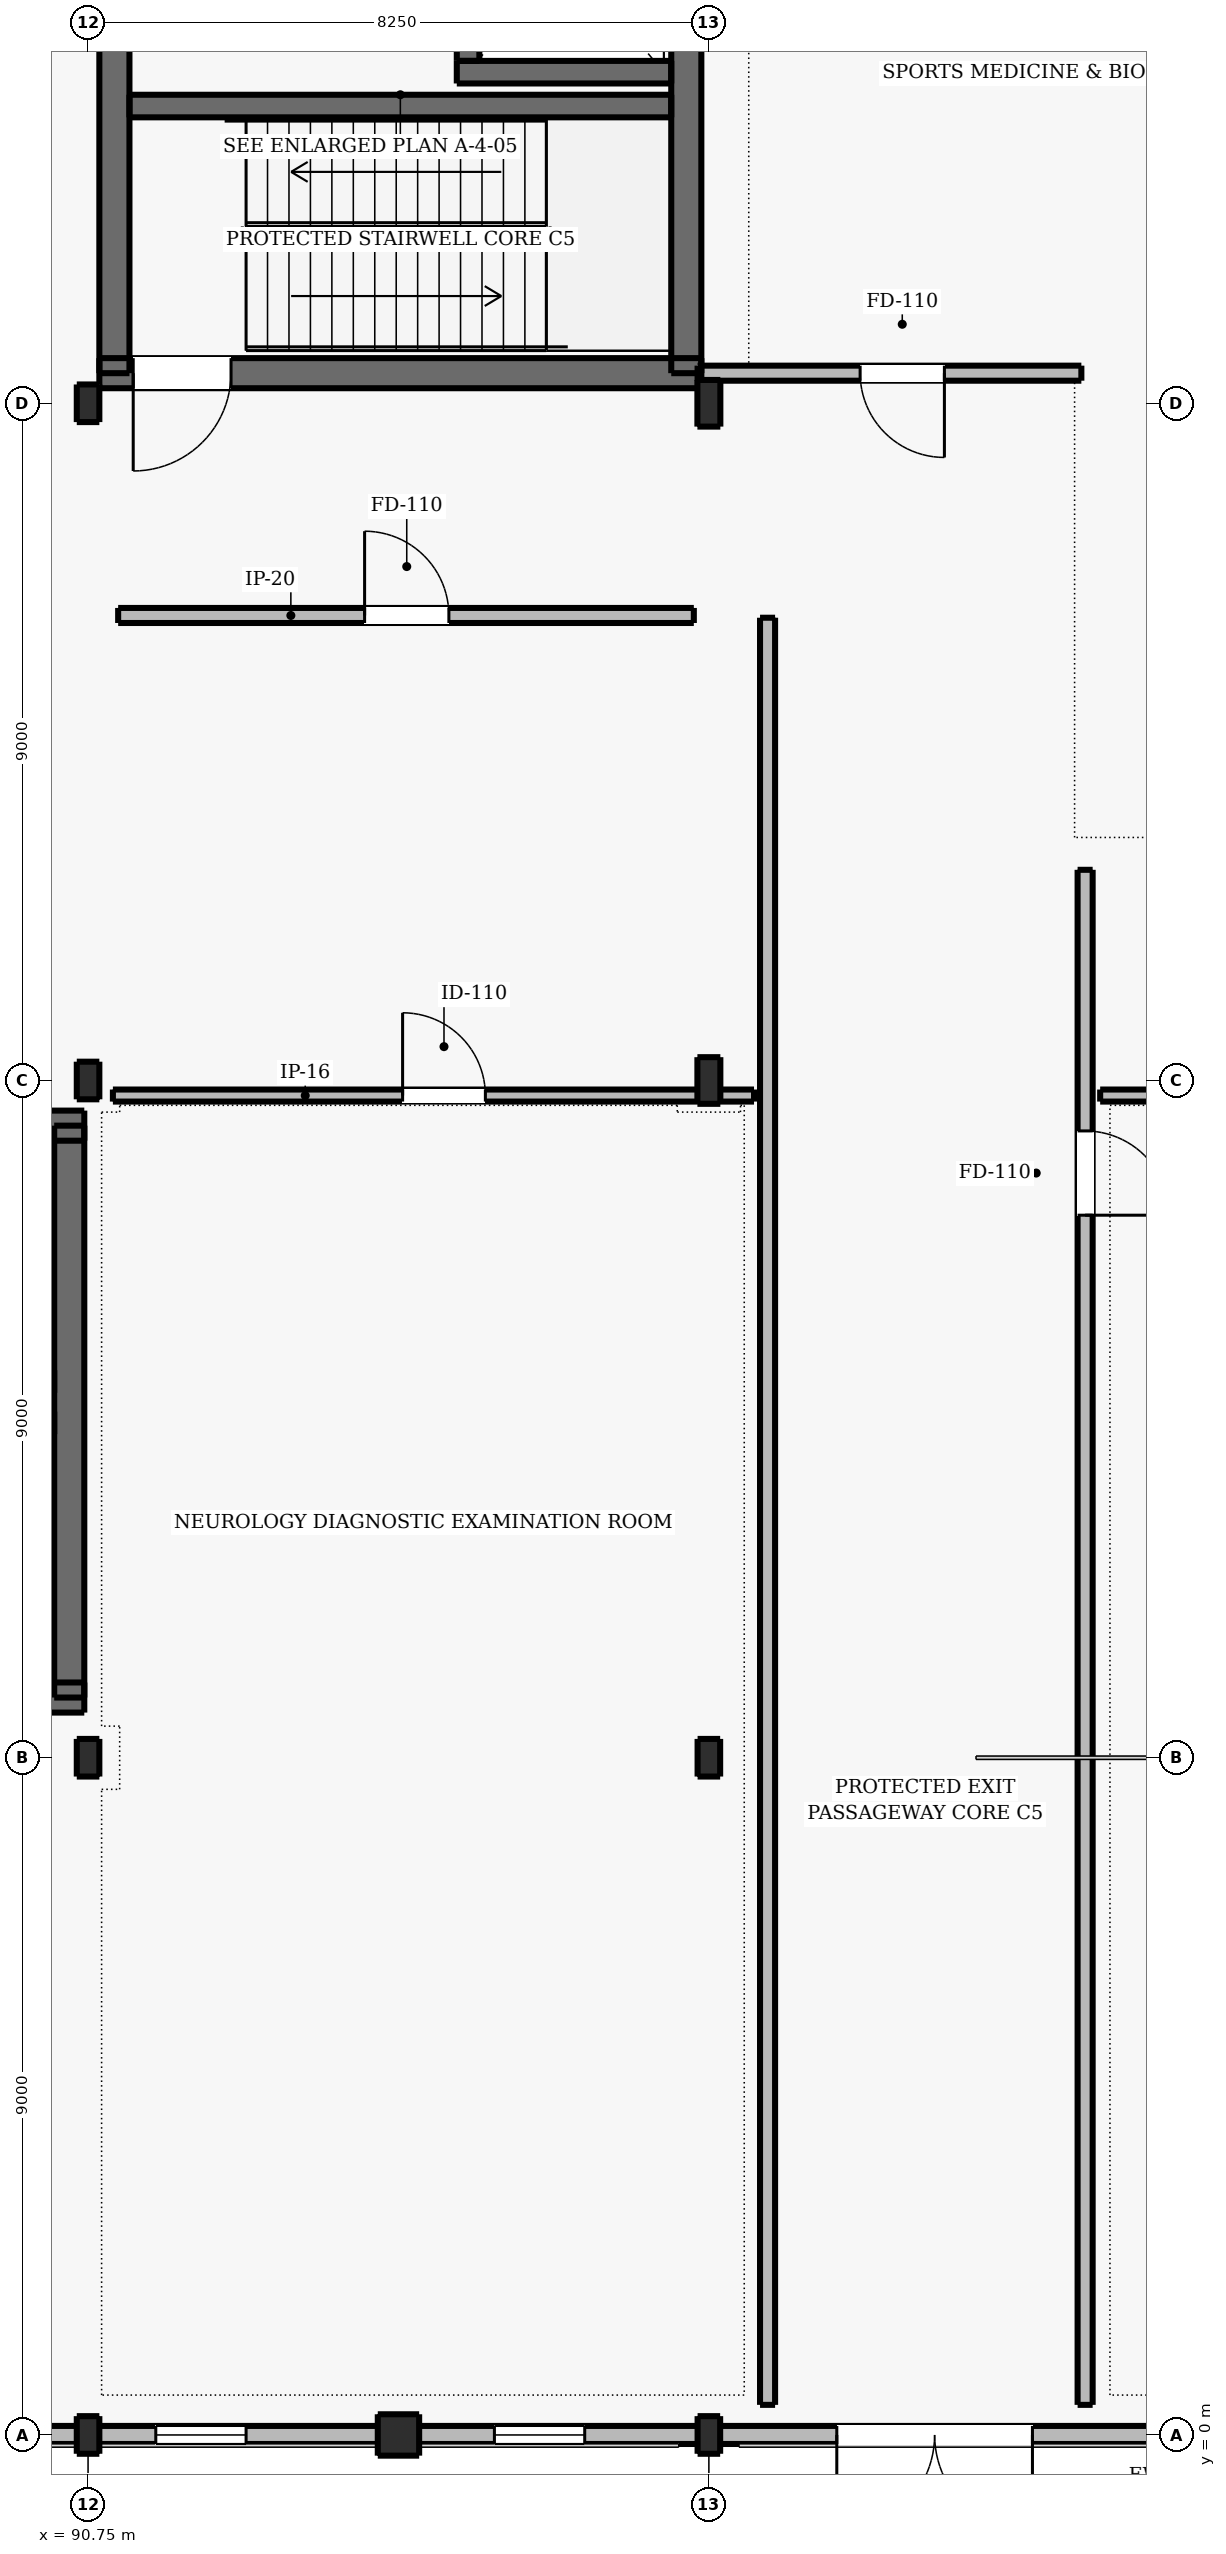
"""IFC4 building model, lengths in metres.
Left out: names, types, materials, properties, quantities, classifications, styles, units other than length and angle.
Written with IfcOpenShell. Run it as: python <this file> out.ifc"""

import sys

from ifc_helpers import new_model, si_unit, direction, frame, frame_2d, origin, origin_2d, place, context, subcontext, project, spatial, rectangle, i_section, extrude, element, fill, save


model = new_model("IFC4")
c1 = context("Model", 3, precision=1e-05, world=origin(), true_north=direction((0.0, 1.0)))
c2 = subcontext(c1, "Body", "Model", "MODEL_VIEW")
j1 = project(units=[si_unit("LENGTHUNIT", "METRE"), si_unit("PLANEANGLEUNIT", "RADIAN")], contexts=[c1])
p1 = place(None, origin())
s1 = spatial("IfcSite", under=j1, at=p1, CompositionType="ELEMENT")
p2 = place(p1, origin())
s2 = spatial("IfcBuilding", under=s1, at=p2, CompositionType="ELEMENT")
p3 = place(p2, origin())
s3 = spatial("IfcBuildingStorey", under=s2, at=p3, CompositionType="ELEMENT", Elevation=0.0)
for number, where, z_axis, x_axis in (
    (1, (90.75, 0.0, 0.0), (0.0, 0.0, 1.0), (1.0, 0.0, 0.0)),
    (2, (90.75, 9.0, 0.0), (0.0, 0.0, 1.0), (1.0, 0.0, 0.0)),
    (3, (90.75, 18.0, 0.0), (0.0, 0.0, 1.0), (1.0, 0.0, 0.0)),
    (4, (90.75, 27.0, 0.0), (0.0, 0.0, 1.0), (1.0, 0.0, 0.0)),
):
    element("IfcColumn", number, at=place(p3, frame(where, z_axis=z_axis, x_axis=x_axis)), inside=s3, PredefinedType="COLUMN", context=c2, shape_type="SweptSolid", body=[
        extrude(i_section(OverallWidth=0.3, OverallDepth=0.5, WebThickness=0.014, FlangeThickness=0.028, FilletRadius=0.027, at=origin_2d()), origin(), (0.0, 0.0, 1.0), 5.1),
    ])
p4 = place(p3, frame((94.875, 0.0, 0.0), z_axis=(0.0, 0.0, 1.0), x_axis=(1.0, 0.0, 0.0)))
e5 = element("IfcColumn", 5, at=p4, inside=s3, PredefinedType="PILASTER", context=c2, shape_type="SweptSolid", body=[
    extrude(rectangle(XDim=0.55, YDim=0.55, at=origin_2d()), origin(), (0.0, 0.0, 1.0), 5.1),
])
for number, where, z_axis, x_axis in (
    (6, (99.0, 0.0, 0.0), (0.0, 0.0, 1.0), (1.0, 0.0, 0.0)),
    (7, (99.0, 9.0, 0.0), (0.0, 0.0, 1.0), (1.0, 0.0, 0.0)),
):
    element("IfcColumn", number, at=place(p3, frame(where, z_axis=z_axis, x_axis=x_axis)), inside=s3, PredefinedType="COLUMN", context=c2, shape_type="SweptSolid", body=[
        extrude(i_section(OverallWidth=0.3, OverallDepth=0.5, WebThickness=0.014, FlangeThickness=0.028, FilletRadius=0.027, at=origin_2d()), origin(), (0.0, 0.0, 1.0), 5.1),
    ])
for number, where, z_axis, x_axis in (
    (8, (99.0, 18.0, 0.0), (0.0, 0.0, 1.0), (1.0, 0.0, 0.0)),
    (9, (99.0, 27.0, 0.0), (0.0, 0.0, 1.0), (1.0, 0.0, 0.0)),
):
    element("IfcColumn", number, at=place(p3, frame(where, z_axis=z_axis, x_axis=x_axis)), inside=s3, PredefinedType="COLUMN", context=c2, shape_type="SweptSolid", body=[
        extrude(i_section(OverallWidth=0.305, OverallDepth=0.62, WebThickness=0.021, FlangeThickness=0.04, FilletRadius=0.027, at=origin_2d()), origin(), (0.0, 0.0, 1.0), 5.1),
    ])
p5 = place(p3, frame((82.7, 9.8, 0.0), z_axis=(0.0, 0.0, 1.0), x_axis=(1.0, 0.0, 0.0)))
e10 = element("IfcWall", 10, at=p5, inside=s3, PredefinedType="SHEAR", context=c2, shape_type="SweptSolid", body=[
    extrude(rectangle(XDim=8.0, YDim=0.4, at=frame_2d((4.0, 0.0))), origin(), (0.0, 0.0, 1.0), 5.1),
])
p6 = place(p5, frame((0.45, 0.0, 0.0)))
e11 = element("IfcOpeningElement", 11, at=p6, cuts=e10, PredefinedType="OPENING", context=c2, shape_type="SweptSolid", body=[
    extrude(rectangle(XDim=1.3, YDim=2.15, at=frame_2d((0.65, 1.075))), frame((0.0, 0.21, 0.0), z_axis=(0.0, -1.0, 0.0), x_axis=(1.0, 0.0, 0.0)), (0.0, 0.0, 1.0), 0.42),
])
p7 = place(p3, frame((82.7, 17.4, 0.0), z_axis=(0.0, 0.0, 1.0), x_axis=(1.0, 0.0, 0.0)))
e12 = element("IfcWall", 12, at=p7, inside=s3, PredefinedType="SHEAR", context=c2, shape_type="SweptSolid", body=[
    extrude(rectangle(XDim=8.0, YDim=0.4, at=frame_2d((4.0, 0.0))), origin(), (0.0, 0.0, 1.0), 5.1),
])
p8 = place(p3, frame((90.5, 9.8, 0.0), z_axis=(0.0, 0.0, 1.0), x_axis=(0.0, 1.0, 0.0)))
e13 = element("IfcWall", 13, at=p8, inside=s3, PredefinedType="SHEAR", context=c2, shape_type="SweptSolid", body=[
    extrude(rectangle(XDim=7.6, YDim=0.4, at=frame_2d((3.8, 0.0))), origin(), (0.0, 0.0, 1.0), 5.1),
])
p9 = place(p3, frame((83.1, 13.45, 0.0), z_axis=(0.0, 0.0, 1.0), x_axis=(1.0, 0.0, 0.0)))
e14 = element("IfcWall", 14, at=p9, inside=s3, PredefinedType="SHEAR", context=c2, shape_type="SweptSolid", body=[
    extrude(rectangle(XDim=7.2, YDim=0.3, at=frame_2d((3.6, 0.0))), origin(), (0.0, 0.0, 1.0), 5.1),
])
p10 = place(p3, frame((87.55, 14.0, 0.0), z_axis=(0.0, 0.0, 1.0), x_axis=(1.0, 0.0, 0.0)))
e15 = element("IfcWall", 15, at=p10, inside=s3, PredefinedType="SHEAR", context=c2, shape_type="SweptSolid", body=[
    extrude(rectangle(XDim=2.75, YDim=0.3, at=frame_2d((1.375, 0.0))), origin(), (0.0, 0.0, 1.0), 5.1),
])
p11 = place(p3, frame((90.9, 27.4, 0.0), z_axis=(0.0, 0.0, 1.0), x_axis=(1.0, 0.0, 0.0)))
e16 = element("IfcWall", 16, at=p11, inside=s3, PredefinedType="SHEAR", context=c2, shape_type="SweptSolid", body=[
    extrude(rectangle(XDim=8.0, YDim=0.4, at=frame_2d((4.0, 0.0))), origin(), (0.0, 0.0, 1.0), 5.1),
])
p12 = place(p11, frame((0.45, 0.0, 0.0)))
e17 = element("IfcOpeningElement", 17, at=p12, cuts=e16, PredefinedType="OPENING", context=c2, shape_type="SweptSolid", body=[
    extrude(rectangle(XDim=1.3, YDim=2.15, at=frame_2d((0.65, 1.075))), frame((0.0, 0.21, 0.0), z_axis=(0.0, -1.0, 0.0), x_axis=(1.0, 0.0, 0.0)), (0.0, 0.0, 1.0), 0.42),
])
for number, where, z_axis, x_axis in (
    (18, (91.1, 27.4, 0.0), (0.0, 0.0, 1.0), (0.0, 1.0, 0.0)),
    (19, (98.7, 27.4, 0.0), (0.0, 0.0, 1.0), (0.0, 1.0, 0.0)),
):
    element("IfcWall", number, at=place(p3, frame(where, z_axis=z_axis, x_axis=x_axis)), inside=s3, PredefinedType="SHEAR", context=c2, shape_type="SweptSolid", body=[
        extrude(rectangle(XDim=7.4, YDim=0.4, at=frame_2d((3.7, 0.0))), origin(), (0.0, 0.0, 1.0), 5.1),
    ])
p13 = place(p3, frame((91.3, 30.95, 0.0), z_axis=(0.0, 0.0, 1.0), x_axis=(1.0, 0.0, 0.0)))
e20 = element("IfcWall", 20, at=p13, inside=s3, PredefinedType="SHEAR", context=c2, shape_type="SweptSolid", body=[
    extrude(rectangle(XDim=7.2, YDim=0.3, at=frame_2d((3.6, 0.0))), origin(), (0.0, 0.0, 1.0), 5.1),
])
p14 = place(p3, frame((95.65, 31.4, 0.0), z_axis=(0.0, 0.0, 1.0), x_axis=(1.0, 0.0, 0.0)))
e21 = element("IfcWall", 21, at=p14, inside=s3, PredefinedType="SHEAR", context=c2, shape_type="SweptSolid", body=[
    extrude(rectangle(XDim=2.85, YDim=0.3, at=frame_2d((1.425, 0.0))), origin(), (0.0, 0.0, 1.0), 5.1),
])
p15 = place(p3, frame((95.8, 31.55, 0.0), z_axis=(0.0, 0.0, 1.0), x_axis=(0.0, 1.0, 0.0)))
e22 = element("IfcWall", 22, at=p15, inside=s3, PredefinedType="SHEAR", context=c2, shape_type="SweptSolid", body=[
    extrude(rectangle(XDim=3.05, YDim=0.3, at=frame_2d((1.525, 0.0))), origin(), (0.0, 0.0, 1.0), 5.1),
])
p16 = place(p15, frame((0.975, 0.0, 0.0)))
e23 = element("IfcOpeningElement", 23, at=p16, cuts=e22, PredefinedType="OPENING", context=c2, shape_type="SweptSolid", body=[
    extrude(rectangle(XDim=1.1, YDim=2.15, at=frame_2d((0.55, 1.075))), frame((0.0, 0.16, 0.0), z_axis=(0.0, -1.0, 0.0), x_axis=(1.0, 0.0, 0.0)), (0.0, 0.0, 1.0), 0.32),
])
p17 = place(p3, frame((99.0, 0.0, 0.0), z_axis=(0.0, 0.0, 1.0), x_axis=(-1.0, 0.0, 0.0)))
e24 = element("IfcWall", 24, at=p17, inside=s3, PredefinedType="SOLIDWALL", context=c2, shape_type="SweptSolid", body=[
    extrude(rectangle(XDim=45.0, YDim=0.24, at=frame_2d((22.5, 0.0))), origin(), (0.0, 0.0, 1.0), 4.31),
])
p18 = place(p17, frame((29.64, 0.0, 0.0)))
e25 = element("IfcOpeningElement", 25, at=p18, cuts=e24, PredefinedType="OPENING", context=c2, shape_type="SweptSolid", body=[
    extrude(rectangle(XDim=2.6, YDim=2.6, at=frame_2d((1.3, 1.3))), frame((0.0, 0.13, 0.0), z_axis=(0.0, -1.0, 0.0), x_axis=(1.0, 0.0, 0.0)), (0.0, 0.0, 1.0), 0.26),
])
p19 = place(p17, frame((17.26, 0.0, 0.0)))
e26 = element("IfcOpeningElement", 26, at=p19, cuts=e24, PredefinedType="OPENING", context=c2, shape_type="SweptSolid", body=[
    extrude(rectangle(XDim=2.6, YDim=2.6, at=frame_2d((1.3, 1.3))), frame((0.0, 0.13, 0.0), z_axis=(0.0, -1.0, 0.0), x_axis=(1.0, 0.0, 0.0)), (0.0, 0.0, 1.0), 0.26),
])
p20 = place(p17, frame((9.01, 0.0, 0.0)))
e27 = element("IfcOpeningElement", 27, at=p20, cuts=e24, PredefinedType="OPENING", context=c2, shape_type="SweptSolid", body=[
    extrude(rectangle(XDim=2.6, YDim=2.6, at=frame_2d((1.3, 1.3))), frame((0.0, 0.13, 0.0), z_axis=(0.0, -1.0, 0.0), x_axis=(1.0, 0.0, 0.0)), (0.0, 0.0, 1.0), 0.26),
])
p21 = place(p17, frame((1.65, 0.0, 1.05)))
e28 = element("IfcOpeningElement", 28, at=p21, cuts=e24, PredefinedType="OPENING", context=c2, shape_type="SweptSolid", body=[
    extrude(rectangle(XDim=1.2, YDim=1.5, at=frame_2d((0.6, 0.75))), frame((0.0, 0.13, 0.0), z_axis=(0.0, -1.0, 0.0), x_axis=(1.0, 0.0, 0.0)), (0.0, 0.0, 1.0), 0.26),
])
p22 = place(p17, frame((6.15, 0.0, 1.05)))
e29 = element("IfcOpeningElement", 29, at=p22, cuts=e24, PredefinedType="OPENING", context=c2, shape_type="SweptSolid", body=[
    extrude(rectangle(XDim=1.2, YDim=1.5, at=frame_2d((0.6, 0.75))), frame((0.0, 0.13, 0.0), z_axis=(0.0, -1.0, 0.0), x_axis=(1.0, 0.0, 0.0)), (0.0, 0.0, 1.0), 0.26),
])
p23 = place(p3, frame((111.0, 0.0, 0.0), z_axis=(0.0, 0.0, 1.0), x_axis=(-1.0, 0.0, 0.0)))
e30 = element("IfcWall", 30, at=p23, inside=s3, PredefinedType="SOLIDWALL", context=c2, shape_type="SweptSolid", body=[
    extrude(rectangle(XDim=12.0, YDim=0.24, at=frame_2d((6.0, 0.0))), origin(), (0.0, 0.0, 1.0), 4.31),
])
p24 = place(p23, frame((7.7, 0.0, 0.0)))
e31 = element("IfcOpeningElement", 31, at=p24, cuts=e30, PredefinedType="OPENING", context=c2, shape_type="SweptSolid", body=[
    extrude(rectangle(XDim=2.6, YDim=2.6, at=frame_2d((1.3, 1.3))), frame((0.0, 0.13, 0.0), z_axis=(0.0, -1.0, 0.0), x_axis=(1.0, 0.0, 0.0)), (0.0, 0.0, 1.0), 0.26),
])
p25 = place(p23, frame((2.3, 0.0, 1.05)))
e32 = element("IfcOpeningElement", 32, at=p25, cuts=e30, PredefinedType="OPENING", context=c2, shape_type="SweptSolid", body=[
    extrude(rectangle(XDim=1.4, YDim=1.9, at=frame_2d((0.7, 0.95))), frame((0.0, 0.13, 0.0), z_axis=(0.0, -1.0, 0.0), x_axis=(1.0, 0.0, 0.0)), (0.0, 0.0, 1.0), 0.26),
])
p26 = place(p3, frame((91.15, 24.18, 0.0), z_axis=(0.0, 0.0, 1.0), x_axis=(1.0, 0.0, 0.0)))
e33 = element("IfcWall", 33, at=p26, inside=s3, PredefinedType="PARTITIONING", context=c2, shape_type="SweptSolid", body=[
    extrude(rectangle(XDim=7.65, YDim=0.2, at=frame_2d((3.825, 0.0))), origin(), (0.0, 0.0, 1.0), 4.82),
])
p27 = place(p26, frame((3.275, 0.0, 0.0)))
e34 = element("IfcOpeningElement", 34, at=p27, cuts=e33, PredefinedType="OPENING", context=c2, shape_type="SweptSolid", body=[
    extrude(rectangle(XDim=1.12, YDim=2.15, at=frame_2d((0.56, 1.075))), frame((0.0, 0.11, 0.0), z_axis=(0.0, -1.0, 0.0), x_axis=(1.0, 0.0, 0.0)), (0.0, 0.0, 1.0), 0.22),
])
p28 = place(p3, frame((98.85, 27.4, 0.0), z_axis=(0.0, 0.0, 1.0), x_axis=(1.0, 0.0, 0.0)))
e35 = element("IfcWall", 35, at=p28, inside=s3, PredefinedType="PARTITIONING", context=c2, shape_type="SweptSolid", body=[
    extrude(rectangle(XDim=5.1, YDim=0.2, at=frame_2d((2.55, 0.0))), origin(), (0.0, 0.0, 1.0), 4.82),
])
p29 = place(p28, frame((2.16, 0.0, 0.0)))
e36 = element("IfcOpeningElement", 36, at=p29, cuts=e35, PredefinedType="OPENING", context=c2, shape_type="SweptSolid", body=[
    extrude(rectangle(XDim=1.12, YDim=2.15, at=frame_2d((0.56, 1.075))), frame((0.0, 0.11, 0.0), z_axis=(0.0, -1.0, 0.0), x_axis=(1.0, 0.0, 0.0)), (0.0, 0.0, 1.0), 0.22),
])
p30 = place(p3, frame((99.78, 0.4, 0.0), z_axis=(0.0, 0.0, 1.0), x_axis=(0.0, 1.0, 0.0)))
e37 = element("IfcWall", 37, at=p30, inside=s3, PredefinedType="PARTITIONING", context=c2, shape_type="SweptSolid", body=[
    extrude(rectangle(XDim=23.75, YDim=0.2, at=frame_2d((11.875, 0.0))), origin(), (0.0, 0.0, 1.0), 4.82),
])
p31 = place(p3, frame((104.0, 0.4, 0.0), z_axis=(0.0, 0.0, 1.0), x_axis=(0.0, 1.0, 0.0)))
e38 = element("IfcWall", 38, at=p31, inside=s3, PredefinedType="PARTITIONING", context=c2, shape_type="SweptSolid", body=[
    extrude(rectangle(XDim=20.4, YDim=0.2, at=frame_2d((10.2, 0.0))), origin(), (0.0, 0.0, 1.0), 4.82),
])
p32 = place(p31, frame((15.81, 0.0, 0.0)))
e39 = element("IfcOpeningElement", 39, at=p32, cuts=e38, PredefinedType="OPENING", context=c2, shape_type="SweptSolid", body=[
    extrude(rectangle(XDim=1.12, YDim=2.15, at=frame_2d((0.56, 1.075))), frame((0.0, 0.11, 0.0), z_axis=(0.0, -1.0, 0.0), x_axis=(1.0, 0.0, 0.0)), (0.0, 0.0, 1.0), 0.22),
])
p33 = place(p3, frame((91.08, 17.8, 0.0), z_axis=(0.0, 0.0, 1.0), x_axis=(1.0, 0.0, 0.0)))
e40 = element("IfcWall", 40, at=p33, inside=s3, PredefinedType="PARTITIONING", context=c2, shape_type="SweptSolid", body=[
    extrude(rectangle(XDim=8.52, YDim=0.16, at=frame_2d((4.26, 0.0))), origin(), (0.0, 0.0, 1.0), 4.26),
])
p34 = place(p33, frame((3.85, 0.0, 0.0)))
e41 = element("IfcOpeningElement", 41, at=p34, cuts=e40, PredefinedType="OPENING", context=c2, shape_type="SweptSolid", body=[
    extrude(rectangle(XDim=1.1, YDim=2.15, at=frame_2d((0.55, 1.075))), frame((0.0, 0.09, 0.0), z_axis=(0.0, -1.0, 0.0), x_axis=(1.0, 0.0, 0.0)), (0.0, 0.0, 1.0), 0.18),
])
p35 = place(p3, frame((104.2, 17.8, 0.0), z_axis=(0.0, 0.0, 1.0), x_axis=(1.0, 0.0, 0.0)))
e42 = element("IfcWall", 42, at=p35, inside=s3, PredefinedType="PARTITIONING", context=c2, shape_type="SweptSolid", body=[
    extrude(rectangle(XDim=6.4, YDim=0.16, at=frame_2d((3.2, 0.0))), origin(), (0.0, 0.0, 1.0), 4.26),
])
p36 = place(p35, frame((2.65, 0.0, 0.0)))
e43 = element("IfcOpeningElement", 43, at=p36, cuts=e42, PredefinedType="OPENING", context=c2, shape_type="SweptSolid", body=[
    extrude(rectangle(XDim=1.1, YDim=2.15, at=frame_2d((0.55, 1.075))), frame((0.0, 0.09, 0.0), z_axis=(0.0, -1.0, 0.0), x_axis=(1.0, 0.0, 0.0)), (0.0, 0.0, 1.0), 0.18),
])
p37 = place(p24, origin())
e44 = element("IfcDoor", 44, at=p37, inside=s3, OperationType="DOUBLE_DOOR_SINGLE_SWING", PredefinedType="DOOR", context=c2, shape_type="SweptSolid", body=[
    extrude(rectangle(XDim=2.6, YDim=2.6, at=frame_2d((1.3, 1.3))), frame((0.0, 0.025, 0.0), z_axis=(0.0, -1.0, 0.0), x_axis=(1.0, 0.0, 0.0)), (0.0, 0.0, 1.0), 0.05),
])
fill(e31, e44)
p38 = place(p21, origin())
e45 = element("IfcWindow", 45, at=p38, inside=s3, PartitioningType="SINGLE_PANEL", PredefinedType="WINDOW", context=c2, shape_type="SweptSolid", body=[
    extrude(rectangle(XDim=1.2, YDim=1.5, at=frame_2d((0.6, 0.75))), frame((0.0, 0.03, 0.0), z_axis=(0.0, -1.0, 0.0), x_axis=(1.0, 0.0, 0.0)), (0.0, 0.0, 1.0), 0.06),
])
fill(e28, e45)
p39 = place(p22, origin())
e46 = element("IfcWindow", 46, at=p39, inside=s3, PartitioningType="SINGLE_PANEL", PredefinedType="WINDOW", context=c2, shape_type="SweptSolid", body=[
    extrude(rectangle(XDim=1.2, YDim=1.5, at=frame_2d((0.6, 0.75))), frame((0.0, 0.03, 0.0), z_axis=(0.0, -1.0, 0.0), x_axis=(1.0, 0.0, 0.0)), (0.0, 0.0, 1.0), 0.06),
])
fill(e29, e46)
p40 = place(p12, frame((1.3, 0.0, 0.0), z_axis=(0.0, 0.0, 1.0), x_axis=(-1.0, 0.0, 0.0)))
e47 = element("IfcDoor", 47, at=p40, inside=s3, OperationType="SINGLE_SWING_LEFT", PredefinedType="DOOR", context=c2, shape_type="SweptSolid", body=[
    extrude(rectangle(XDim=1.3, YDim=2.15, at=frame_2d((0.65, 1.075))), frame((0.0, 0.025, 0.0), z_axis=(0.0, -1.0, 0.0), x_axis=(1.0, 0.0, 0.0)), (0.0, 0.0, 1.0), 0.05),
])
fill(e17, e47)
p41 = place(p27, origin())
e48 = element("IfcDoor", 48, at=p41, inside=s3, OperationType="SINGLE_SWING_LEFT", PredefinedType="DOOR", context=c2, shape_type="SweptSolid", body=[
    extrude(rectangle(XDim=1.12, YDim=2.15, at=frame_2d((0.56, 1.075))), frame((0.0, 0.025, 0.0), z_axis=(0.0, -1.0, 0.0), x_axis=(1.0, 0.0, 0.0)), (0.0, 0.0, 1.0), 0.05),
])
fill(e34, e48)
p42 = place(p29, frame((1.12, 0.0, 0.0), z_axis=(0.0, 0.0, 1.0), x_axis=(-1.0, 0.0, 0.0)))
e49 = element("IfcDoor", 49, at=p42, inside=s3, OperationType="SINGLE_SWING_RIGHT", PredefinedType="DOOR", context=c2, shape_type="SweptSolid", body=[
    extrude(rectangle(XDim=1.12, YDim=2.15, at=frame_2d((0.56, 1.075))), frame((0.0, 0.025, 0.0), z_axis=(0.0, -1.0, 0.0), x_axis=(1.0, 0.0, 0.0)), (0.0, 0.0, 1.0), 0.05),
])
fill(e36, e49)
p43 = place(p32, frame((1.12, 0.0, 0.0), z_axis=(0.0, 0.0, 1.0), x_axis=(-1.0, 0.0, 0.0)))
e50 = element("IfcDoor", 50, at=p43, inside=s3, OperationType="SINGLE_SWING_LEFT", PredefinedType="DOOR", context=c2, shape_type="SweptSolid", body=[
    extrude(rectangle(XDim=1.12, YDim=2.15, at=frame_2d((0.56, 1.075))), frame((0.0, 0.025, 0.0), z_axis=(0.0, -1.0, 0.0), x_axis=(1.0, 0.0, 0.0)), (0.0, 0.0, 1.0), 0.05),
])
fill(e39, e50)
p44 = place(p34, origin())
e51 = element("IfcDoor", 51, at=p44, inside=s3, OperationType="SINGLE_SWING_LEFT", PredefinedType="DOOR", context=c2, shape_type="SweptSolid", body=[
    extrude(rectangle(XDim=1.1, YDim=2.15, at=frame_2d((0.55, 1.075))), frame((0.0, 0.025, 0.0), z_axis=(0.0, -1.0, 0.0), x_axis=(1.0, 0.0, 0.0)), (0.0, 0.0, 1.0), 0.05),
])
fill(e41, e51)
save(model, sys.argv[1])
